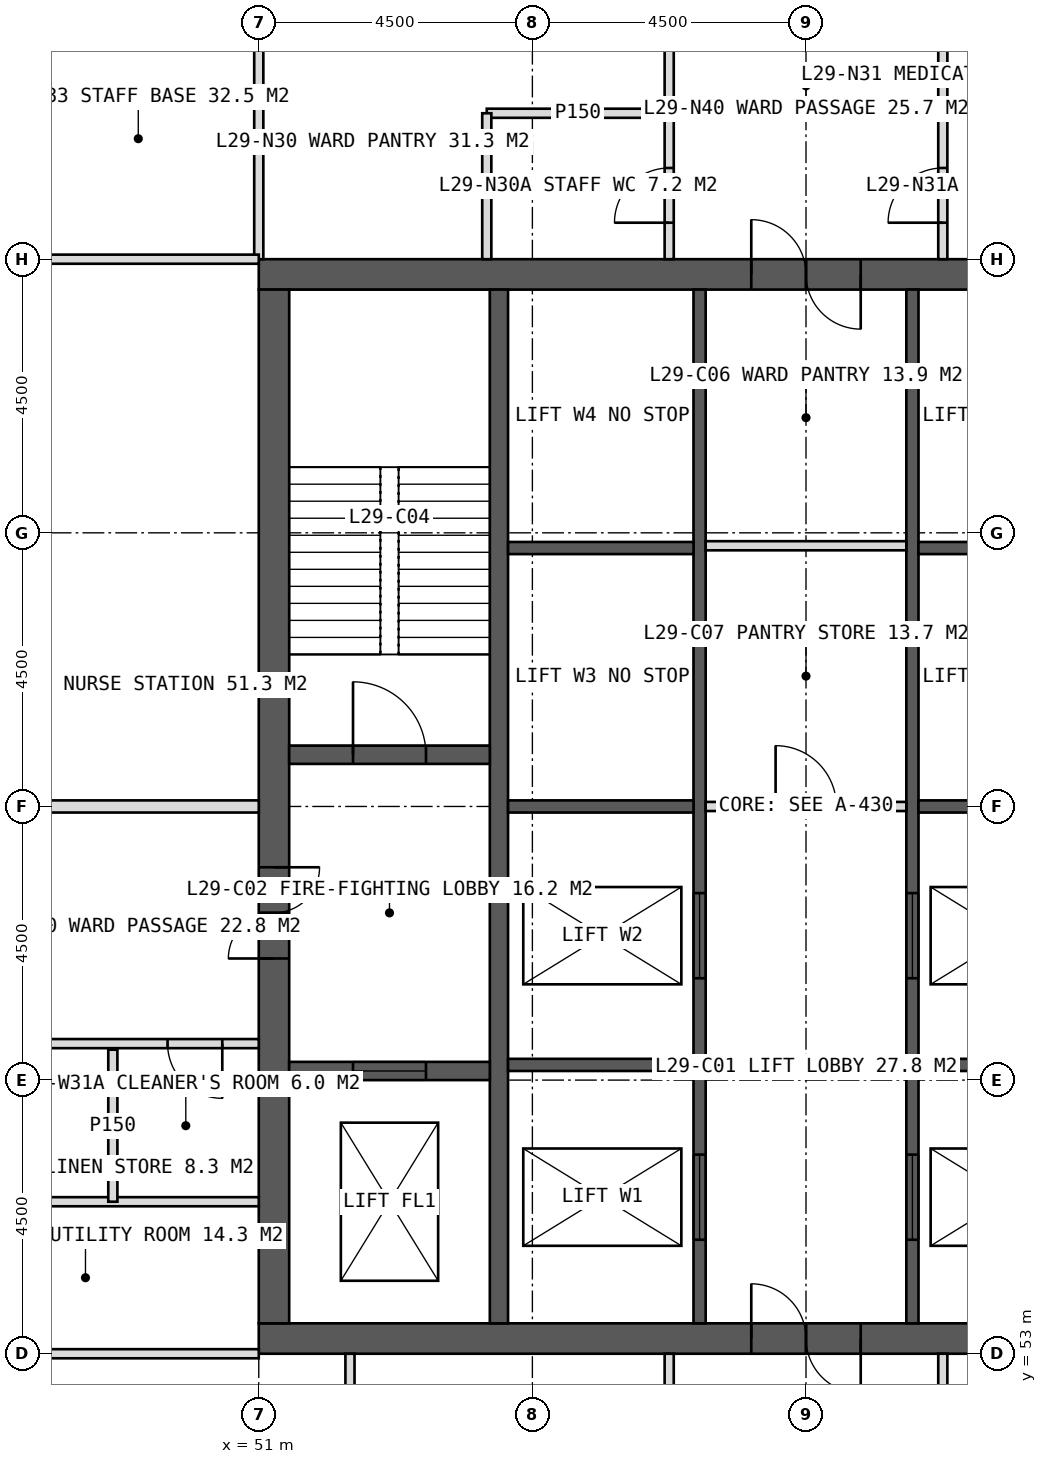
"""IFC4 building model, lengths in metres.
Left out: names, types, materials, properties, quantities, classifications, styles, units other than length and angle.
Written with IfcOpenShell. Run it as: python <this file> out.ifc"""

import sys

from ifc_helpers import new_model, si_unit, direction, frame, frame_2d, origin, place, context, subcontext, project, spatial, rectangle, extrude, element, fill, save


model = new_model("IFC4")
c1 = context("Model", 3, precision=1e-05, world=origin(), true_north=direction((0.0, 1.0)))
c2 = subcontext(c1, "Body", "Model", "MODEL_VIEW")
j1 = project(units=[si_unit("LENGTHUNIT", "METRE"), si_unit("PLANEANGLEUNIT", "RADIAN")], contexts=[c1])
p1 = place(None, origin())
s1 = spatial("IfcSite", under=j1, at=p1, CompositionType="ELEMENT")
p2 = place(p1, origin())
s2 = spatial("IfcBuilding", under=s1, at=p2, CompositionType="ELEMENT")
p3 = place(p2, frame((0.0, 0.0, 124.0)))
s3 = spatial("IfcBuildingStorey", under=s2, at=p3, CompositionType="ELEMENT", Elevation=124.0)
p4 = place(p3, frame((51.0, 70.75, 0.0), z_axis=(0.0, 0.0, 1.0), x_axis=(1.0, 0.0, 0.0)))
e1 = element("IfcWall", 1, at=p4, inside=s3, PredefinedType="SHEAR", context=c2, shape_type="SweptSolid", body=[
    extrude(rectangle(XDim=18.0, YDim=0.5, at=frame_2d((9.0, 0.0))), origin(), (0.0, 0.0, 1.0), 4.0),
])
p5 = place(p4, frame((8.1, 0.0, 0.0)))
e2 = element("IfcOpeningElement", 2, at=p5, cuts=e1, PredefinedType="OPENING", context=c2, shape_type="SweptSolid", body=[
    extrude(rectangle(XDim=1.8, YDim=2.2, at=frame_2d((0.9, 1.1))), frame((0.0, 0.26, 0.0), z_axis=(0.0, -1.0, 0.0), x_axis=(1.0, 0.0, 0.0)), (0.0, 0.0, 1.0), 0.52),
])
p6 = place(p3, frame((51.0, 53.25, 0.0), z_axis=(0.0, 0.0, 1.0), x_axis=(1.0, 0.0, 0.0)))
e3 = element("IfcWall", 3, at=p6, inside=s3, PredefinedType="SHEAR", context=c2, shape_type="SweptSolid", body=[
    extrude(rectangle(XDim=18.0, YDim=0.5, at=frame_2d((9.0, 0.0))), origin(), (0.0, 0.0, 1.0), 4.0),
])
p7 = place(p6, frame((8.1, 0.0, 0.0)))
e4 = element("IfcOpeningElement", 4, at=p7, cuts=e3, PredefinedType="OPENING", context=c2, shape_type="SweptSolid", body=[
    extrude(rectangle(XDim=1.8, YDim=2.2, at=frame_2d((0.9, 1.1))), frame((0.0, 0.26, 0.0), z_axis=(0.0, -1.0, 0.0), x_axis=(1.0, 0.0, 0.0)), (0.0, 0.0, 1.0), 0.52),
])
p8 = place(p3, frame((51.25, 53.5, 0.0), z_axis=(0.0, 0.0, 1.0), x_axis=(0.0, 1.0, 0.0)))
e5 = element("IfcWall", 5, at=p8, inside=s3, PredefinedType="SHEAR", context=c2, shape_type="SweptSolid", body=[
    extrude(rectangle(XDim=17.0, YDim=0.5, at=frame_2d((8.5, 0.0))), origin(), (0.0, 0.0, 1.0), 4.0),
])
p9 = place(p8, frame((6.0, 0.0, 0.0)))
e6 = element("IfcOpeningElement", 6, at=p9, cuts=e5, PredefinedType="OPENING", context=c2, shape_type="SweptSolid", body=[
    extrude(rectangle(XDim=1.5, YDim=2.2, at=frame_2d((0.75, 1.1))), frame((0.0, 0.26, 0.0), z_axis=(0.0, -1.0, 0.0), x_axis=(1.0, 0.0, 0.0)), (0.0, 0.0, 1.0), 0.52),
])
p10 = place(p3, frame((54.95, 53.5, 0.0), z_axis=(0.0, 0.0, 1.0), x_axis=(0.0, 1.0, 0.0)))
e7 = element("IfcWall", 7, at=p10, inside=s3, PredefinedType="SHEAR", context=c2, shape_type="SweptSolid", body=[
    extrude(rectangle(XDim=17.0, YDim=0.3, at=frame_2d((8.5, 0.0))), origin(), (0.0, 0.0, 1.0), 4.0),
])
p11 = place(p3, frame((58.25, 53.5, 0.0), z_axis=(0.0, 0.0, 1.0), x_axis=(0.0, 1.0, 0.0)))
e8 = element("IfcWall", 8, at=p11, inside=s3, PredefinedType="SHEAR", context=c2, shape_type="SweptSolid", body=[
    extrude(rectangle(XDim=17.0, YDim=0.2, at=frame_2d((8.5, 0.0))), origin(), (0.0, 0.0, 1.0), 4.0),
])
p12 = place(p11, frame((1.375, 0.0, 0.0)))
e9 = element("IfcOpeningElement", 9, at=p12, cuts=e8, PredefinedType="OPENING", context=c2, shape_type="SweptSolid", body=[
    extrude(rectangle(XDim=1.4, YDim=2.2, at=frame_2d((0.7, 1.1))), frame((0.0, 0.11, 0.0), z_axis=(0.0, -1.0, 0.0), x_axis=(1.0, 0.0, 0.0)), (0.0, 0.0, 1.0), 0.22),
])
p13 = place(p11, frame((5.675, 0.0, 0.0)))
e10 = element("IfcOpeningElement", 10, at=p13, cuts=e8, PredefinedType="OPENING", context=c2, shape_type="SweptSolid", body=[
    extrude(rectangle(XDim=1.4, YDim=2.2, at=frame_2d((0.7, 1.1))), frame((0.0, 0.11, 0.0), z_axis=(0.0, -1.0, 0.0), x_axis=(1.0, 0.0, 0.0)), (0.0, 0.0, 1.0), 0.22),
])
p14 = place(p3, frame((61.75, 53.5, 0.0), z_axis=(0.0, 0.0, 1.0), x_axis=(0.0, 1.0, 0.0)))
e11 = element("IfcWall", 11, at=p14, inside=s3, PredefinedType="SHEAR", context=c2, shape_type="SweptSolid", body=[
    extrude(rectangle(XDim=17.0, YDim=0.2, at=frame_2d((8.5, 0.0))), origin(), (0.0, 0.0, 1.0), 4.0),
])
p15 = place(p14, frame((1.375, 0.0, 0.0)))
e12 = element("IfcOpeningElement", 12, at=p15, cuts=e11, PredefinedType="OPENING", context=c2, shape_type="SweptSolid", body=[
    extrude(rectangle(XDim=1.4, YDim=2.2, at=frame_2d((0.7, 1.1))), frame((0.0, 0.11, 0.0), z_axis=(0.0, -1.0, 0.0), x_axis=(1.0, 0.0, 0.0)), (0.0, 0.0, 1.0), 0.22),
])
p16 = place(p14, frame((5.675, 0.0, 0.0)))
e13 = element("IfcOpeningElement", 13, at=p16, cuts=e11, PredefinedType="OPENING", context=c2, shape_type="SweptSolid", body=[
    extrude(rectangle(XDim=1.4, YDim=2.2, at=frame_2d((0.7, 1.1))), frame((0.0, 0.11, 0.0), z_axis=(0.0, -1.0, 0.0), x_axis=(1.0, 0.0, 0.0)), (0.0, 0.0, 1.0), 0.22),
])
for number, where, z_axis, x_axis in (
    (14, (55.1, 57.75, 0.0), (0.0, 0.0, 1.0), (1.0, 0.0, 0.0)),
    (15, (61.85, 57.75, 0.0), (0.0, 0.0, 1.0), (1.0, 0.0, 0.0)),
    (16, (55.1, 62.0, 0.0), (0.0, 0.0, 1.0), (1.0, 0.0, 0.0)),
    (17, (61.85, 62.0, 0.0), (0.0, 0.0, 1.0), (1.0, 0.0, 0.0)),
    (18, (55.1, 66.25, 0.0), (0.0, 0.0, 1.0), (1.0, 0.0, 0.0)),
    (19, (61.85, 66.25, 0.0), (0.0, 0.0, 1.0), (1.0, 0.0, 0.0)),
):
    element("IfcWall", number, at=place(p3, frame(where, z_axis=z_axis, x_axis=x_axis)), inside=s3, PredefinedType="SHEAR", context=c2, shape_type="SweptSolid", body=[
        extrude(rectangle(XDim=3.05, YDim=0.2, at=frame_2d((1.525, 0.0))), origin(), (0.0, 0.0, 1.0), 4.0),
    ])
p17 = place(p3, frame((51.5, 62.85, 0.0), z_axis=(0.0, 0.0, 1.0), x_axis=(1.0, 0.0, 0.0)))
e20 = element("IfcWall", 20, at=p17, inside=s3, PredefinedType="SHEAR", context=c2, shape_type="SweptSolid", body=[
    extrude(rectangle(XDim=3.3, YDim=0.3, at=frame_2d((1.65, 0.0))), origin(), (0.0, 0.0, 1.0), 4.0),
])
p18 = place(p17, frame((1.05, 0.0, 0.0)))
e21 = element("IfcOpeningElement", 21, at=p18, cuts=e20, PredefinedType="OPENING", context=c2, shape_type="SweptSolid", body=[
    extrude(rectangle(XDim=1.2, YDim=2.1, at=frame_2d((0.6, 1.05))), frame((0.0, 0.16, 0.0), z_axis=(0.0, -1.0, 0.0), x_axis=(1.0, 0.0, 0.0)), (0.0, 0.0, 1.0), 0.32),
])
p19 = place(p3, frame((51.5, 57.65, 0.0), z_axis=(0.0, 0.0, 1.0), x_axis=(1.0, 0.0, 0.0)))
e22 = element("IfcWall", 22, at=p19, inside=s3, PredefinedType="SHEAR", context=c2, shape_type="SweptSolid", body=[
    extrude(rectangle(XDim=3.3, YDim=0.3, at=frame_2d((1.65, 0.0))), origin(), (0.0, 0.0, 1.0), 4.0),
])
p20 = place(p19, frame((1.05, 0.0, 0.0)))
e23 = element("IfcOpeningElement", 23, at=p20, cuts=e22, PredefinedType="OPENING", context=c2, shape_type="SweptSolid", body=[
    extrude(rectangle(XDim=1.2, YDim=2.2, at=frame_2d((0.6, 1.1))), frame((0.0, 0.16, 0.0), z_axis=(0.0, -1.0, 0.0), x_axis=(1.0, 0.0, 0.0)), (0.0, 0.0, 1.0), 0.32),
])
p21 = place(p3, frame((51.0, 71.0, 0.0), z_axis=(0.0, 0.0, 1.0), x_axis=(0.0, 1.0, 0.0)))
e24 = element("IfcWall", 24, at=p21, inside=s3, PredefinedType="PARTITIONING", context=c2, shape_type="SweptSolid", body=[
    extrude(rectangle(XDim=5.7, YDim=0.15, at=frame_2d((2.85, 0.0))), origin(), (0.0, 0.0, 1.0), 3.75),
])
p22 = place(p3, frame((57.75, 71.0, 0.0), z_axis=(0.0, 0.0, 1.0), x_axis=(0.0, 1.0, 0.0)))
e25 = element("IfcWall", 25, at=p22, inside=s3, PredefinedType="PARTITIONING", context=c2, shape_type="SweptSolid", body=[
    extrude(rectangle(XDim=5.7, YDim=0.15, at=frame_2d((2.85, 0.0))), origin(), (0.0, 0.0, 1.0), 3.75),
])
p23 = place(p22, frame((0.6, 0.0, 0.0)))
e26 = element("IfcOpeningElement", 26, at=p23, cuts=e25, PredefinedType="OPENING", context=c2, shape_type="SweptSolid", body=[
    extrude(rectangle(XDim=0.9, YDim=2.1, at=frame_2d((0.45, 1.05))), frame((0.0, 0.085, 0.0), z_axis=(0.0, -1.0, 0.0), x_axis=(1.0, 0.0, 0.0)), (0.0, 0.0, 1.0), 0.17),
])
p24 = place(p3, frame((62.25, 71.0, 0.0), z_axis=(0.0, 0.0, 1.0), x_axis=(0.0, 1.0, 0.0)))
e27 = element("IfcWall", 27, at=p24, inside=s3, PredefinedType="PARTITIONING", context=c2, shape_type="SweptSolid", body=[
    extrude(rectangle(XDim=5.7, YDim=0.15, at=frame_2d((2.85, 0.0))), origin(), (0.0, 0.0, 1.0), 3.75),
])
p25 = place(p24, frame((0.6, 0.0, 0.0)))
e28 = element("IfcOpeningElement", 28, at=p25, cuts=e27, PredefinedType="OPENING", context=c2, shape_type="SweptSolid", body=[
    extrude(rectangle(XDim=0.9, YDim=2.1, at=frame_2d((0.45, 1.05))), frame((0.0, 0.085, 0.0), z_axis=(0.0, -1.0, 0.0), x_axis=(1.0, 0.0, 0.0)), (0.0, 0.0, 1.0), 0.17),
])
p26 = place(p3, frame((54.75, 73.4, 0.0), z_axis=(0.0, 0.0, 1.0), x_axis=(1.0, 0.0, 0.0)))
e29 = element("IfcWall", 29, at=p26, inside=s3, PredefinedType="PARTITIONING", context=c2, shape_type="SweptSolid", body=[
    extrude(rectangle(XDim=3.0, YDim=0.15, at=frame_2d((1.5, 0.0))), origin(), (0.0, 0.0, 1.0), 3.75),
])
p27 = place(p3, frame((54.75, 71.0, 0.0), z_axis=(0.0, 0.0, 1.0), x_axis=(0.0, 1.0, 0.0)))
e30 = element("IfcWall", 30, at=p27, inside=s3, PredefinedType="PARTITIONING", context=c2, shape_type="SweptSolid", body=[
    extrude(rectangle(XDim=2.4, YDim=0.15, at=frame_2d((1.2, 0.0))), origin(), (0.0, 0.0, 1.0), 3.75),
])
p28 = place(p3, frame((62.25, 73.4, 0.0), z_axis=(0.0, 0.0, 1.0), x_axis=(1.0, 0.0, 0.0)))
e31 = element("IfcWall", 31, at=p28, inside=s3, PredefinedType="PARTITIONING", context=c2, shape_type="SweptSolid", body=[
    extrude(rectangle(XDim=3.0, YDim=0.15, at=frame_2d((1.5, 0.0))), origin(), (0.0, 0.0, 1.0), 3.75),
])
p29 = place(p3, frame((51.0, 53.0, 0.0), z_axis=(0.0, 0.0, 1.0), x_axis=(-1.0, 0.0, 0.0)))
e32 = element("IfcWall", 32, at=p29, inside=s3, PredefinedType="PARTITIONING", context=c2, shape_type="SweptSolid", body=[
    extrude(rectangle(XDim=5.7, YDim=0.15, at=frame_2d((2.85, 0.0))), origin(), (0.0, 0.0, 1.0), 3.75),
])
p30 = place(p3, frame((51.0, 58.1, 0.0), z_axis=(0.0, 0.0, 1.0), x_axis=(-1.0, 0.0, 0.0)))
e33 = element("IfcWall", 33, at=p30, inside=s3, PredefinedType="PARTITIONING", context=c2, shape_type="SweptSolid", body=[
    extrude(rectangle(XDim=5.7, YDim=0.15, at=frame_2d((2.85, 0.0))), origin(), (0.0, 0.0, 1.0), 3.75),
])
p31 = place(p30, frame((0.6, 0.0, 0.0)))
e34 = element("IfcOpeningElement", 34, at=p31, cuts=e33, PredefinedType="OPENING", context=c2, shape_type="SweptSolid", body=[
    extrude(rectangle(XDim=0.9, YDim=2.1, at=frame_2d((0.45, 1.05))), frame((0.0, 0.085, 0.0), z_axis=(0.0, -1.0, 0.0), x_axis=(1.0, 0.0, 0.0)), (0.0, 0.0, 1.0), 0.17),
])
p32 = place(p3, frame((51.0, 62.0, 0.0), z_axis=(0.0, 0.0, 1.0), x_axis=(-1.0, 0.0, 0.0)))
e35 = element("IfcWall", 35, at=p32, inside=s3, PredefinedType="SOLIDWALL", context=c2, shape_type="SweptSolid", body=[
    extrude(rectangle(XDim=5.7, YDim=0.2, at=frame_2d((2.85, 0.0))), origin(), (0.0, 0.0, 1.0), 2.95),
])
for number, where, z_axis, x_axis in (
    (36, (51.0, 55.5, 0.0), (0.0, 0.0, 1.0), (-1.0, 0.0, 0.0)),
    (37, (51.0, 71.0, 0.0), (0.0, 0.0, 1.0), (-1.0, 0.0, 0.0)),
):
    element("IfcWall", number, at=place(p3, frame(where, z_axis=z_axis, x_axis=x_axis)), inside=s3, PredefinedType="PARTITIONING", context=c2, shape_type="SweptSolid", body=[
        extrude(rectangle(XDim=5.7, YDim=0.15, at=frame_2d((2.85, 0.0))), origin(), (0.0, 0.0, 1.0), 3.75),
    ])
p33 = place(p3, frame((48.6, 55.5, 0.0), z_axis=(0.0, 0.0, 1.0), x_axis=(0.0, 1.0, 0.0)))
e38 = element("IfcWall", 38, at=p33, inside=s3, PredefinedType="PARTITIONING", context=c2, shape_type="SweptSolid", body=[
    extrude(rectangle(XDim=2.5, YDim=0.15, at=frame_2d((1.25, 0.0))), origin(), (0.0, 0.0, 1.0), 3.75),
])
for number, where, z_axis, x_axis in (
    (39, (62.25, 53.0, 0.0), (0.0, 0.0, 1.0), (0.0, -1.0, 0.0)),
    (40, (57.75, 53.0, 0.0), (0.0, 0.0, 1.0), (0.0, -1.0, 0.0)),
    (41, (52.5, 53.0, 0.0), (0.0, 0.0, 1.0), (0.0, -1.0, 0.0)),
):
    element("IfcWall", number, at=place(p3, frame(where, z_axis=z_axis, x_axis=x_axis)), inside=s3, PredefinedType="PARTITIONING", context=c2, shape_type="SweptSolid", body=[
        extrude(rectangle(XDim=5.7, YDim=0.15, at=frame_2d((2.85, 0.0))), origin(), (0.0, 0.0, 1.0), 3.75),
    ])
p34 = place(p3, frame((58.35, 62.0, 0.0), z_axis=(0.0, 0.0, 1.0), x_axis=(1.0, 0.0, 0.0)))
e42 = element("IfcWall", 42, at=p34, inside=s3, PredefinedType="PARTITIONING", context=c2, shape_type="SweptSolid", body=[
    extrude(rectangle(XDim=3.3, YDim=0.15, at=frame_2d((1.65, 0.0))), origin(), (0.0, 0.0, 1.0), 3.75),
])
p35 = place(p34, frame((1.15, 0.0, 0.0)))
e43 = element("IfcOpeningElement", 43, at=p35, cuts=e42, PredefinedType="OPENING", context=c2, shape_type="SweptSolid", body=[
    extrude(rectangle(XDim=1.0, YDim=2.1, at=frame_2d((0.5, 1.05))), frame((0.0, 0.085, 0.0), z_axis=(0.0, -1.0, 0.0), x_axis=(1.0, 0.0, 0.0)), (0.0, 0.0, 1.0), 0.17),
])
p36 = place(p3, frame((58.35, 66.288, 0.0), z_axis=(0.0, 0.0, 1.0), x_axis=(1.0, 0.0, 0.0)))
e44 = element("IfcWall", 44, at=p36, inside=s3, PredefinedType="PARTITIONING", context=c2, shape_type="SweptSolid", body=[
    extrude(rectangle(XDim=3.3, YDim=0.15, at=frame_2d((1.65, 0.0))), origin(), (0.0, 0.0, 1.0), 3.75),
])
p37 = place(p23, origin())
e45 = element("IfcDoor", 45, at=p37, inside=s3, OperationType="SINGLE_SWING_LEFT", PredefinedType="DOOR", context=c2, shape_type="SweptSolid", body=[
    extrude(rectangle(XDim=0.9, YDim=2.1, at=frame_2d((0.45, 1.05))), frame((0.0, 0.025, 0.0), z_axis=(0.0, -1.0, 0.0), x_axis=(1.0, 0.0, 0.0)), (0.0, 0.0, 1.0), 0.05),
])
fill(e26, e45)
p38 = place(p25, origin())
e46 = element("IfcDoor", 46, at=p38, inside=s3, OperationType="SINGLE_SWING_LEFT", PredefinedType="DOOR", context=c2, shape_type="SweptSolid", body=[
    extrude(rectangle(XDim=0.9, YDim=2.1, at=frame_2d((0.45, 1.05))), frame((0.0, 0.025, 0.0), z_axis=(0.0, -1.0, 0.0), x_axis=(1.0, 0.0, 0.0)), (0.0, 0.0, 1.0), 0.05),
])
fill(e28, e46)
p39 = place(p31, origin())
e47 = element("IfcDoor", 47, at=p39, inside=s3, OperationType="SINGLE_SWING_LEFT", PredefinedType="DOOR", context=c2, shape_type="SweptSolid", body=[
    extrude(rectangle(XDim=0.9, YDim=2.1, at=frame_2d((0.45, 1.05))), frame((0.0, 0.025, 0.0), z_axis=(0.0, -1.0, 0.0), x_axis=(1.0, 0.0, 0.0)), (0.0, 0.0, 1.0), 0.05),
])
fill(e34, e47)
p40 = place(p7, origin())
e48 = element("IfcDoor", 48, at=p40, inside=s3, OperationType="DOUBLE_DOOR_SINGLE_SWING", PredefinedType="DOOR", context=c2, shape_type="SweptSolid", body=[
    extrude(rectangle(XDim=1.8, YDim=2.2, at=frame_2d((0.9, 1.1))), frame((0.0, 0.025, 0.0), z_axis=(0.0, -1.0, 0.0), x_axis=(1.0, 0.0, 0.0)), (0.0, 0.0, 1.0), 0.05),
])
fill(e4, e48)
p41 = place(p9, origin())
e49 = element("IfcDoor", 49, at=p41, inside=s3, OperationType="DOUBLE_DOOR_SINGLE_SWING", PredefinedType="DOOR", context=c2, shape_type="SweptSolid", body=[
    extrude(rectangle(XDim=1.5, YDim=2.2, at=frame_2d((0.75, 1.1))), frame((0.0, 0.025, 0.0), z_axis=(0.0, -1.0, 0.0), x_axis=(1.0, 0.0, 0.0)), (0.0, 0.0, 1.0), 0.05),
])
fill(e6, e49)
p42 = place(p18, origin())
e50 = element("IfcDoor", 50, at=p42, inside=s3, OperationType="SINGLE_SWING_LEFT", PredefinedType="DOOR", context=c2, shape_type="SweptSolid", body=[
    extrude(rectangle(XDim=1.2, YDim=2.1, at=frame_2d((0.6, 1.05))), frame((0.0, 0.025, 0.0), z_axis=(0.0, -1.0, 0.0), x_axis=(1.0, 0.0, 0.0)), (0.0, 0.0, 1.0), 0.05),
])
fill(e21, e50)
p43 = place(p20, origin())
e51 = element("IfcDoor", 51, at=p43, inside=s3, OperationType="SLIDING_TO_LEFT", PredefinedType="DOOR", context=c2, shape_type="SweptSolid", body=[
    extrude(rectangle(XDim=1.2, YDim=2.2, at=frame_2d((0.6, 1.1))), frame((0.0, 0.025, 0.0), z_axis=(0.0, -1.0, 0.0), x_axis=(1.0, 0.0, 0.0)), (0.0, 0.0, 1.0), 0.05),
])
fill(e23, e51)
p44 = place(p12, origin())
e52 = element("IfcDoor", 52, at=p44, inside=s3, OperationType="SLIDING_TO_LEFT", PredefinedType="DOOR", context=c2, shape_type="SweptSolid", body=[
    extrude(rectangle(XDim=1.4, YDim=2.2, at=frame_2d((0.7, 1.1))), frame((0.0, 0.025, 0.0), z_axis=(0.0, -1.0, 0.0), x_axis=(1.0, 0.0, 0.0)), (0.0, 0.0, 1.0), 0.05),
])
fill(e9, e52)
p45 = place(p15, origin())
e53 = element("IfcDoor", 53, at=p45, inside=s3, OperationType="SLIDING_TO_LEFT", PredefinedType="DOOR", context=c2, shape_type="SweptSolid", body=[
    extrude(rectangle(XDim=1.4, YDim=2.2, at=frame_2d((0.7, 1.1))), frame((0.0, 0.025, 0.0), z_axis=(0.0, -1.0, 0.0), x_axis=(1.0, 0.0, 0.0)), (0.0, 0.0, 1.0), 0.05),
])
fill(e12, e53)
p46 = place(p13, origin())
e54 = element("IfcDoor", 54, at=p46, inside=s3, OperationType="SLIDING_TO_LEFT", PredefinedType="DOOR", context=c2, shape_type="SweptSolid", body=[
    extrude(rectangle(XDim=1.4, YDim=2.2, at=frame_2d((0.7, 1.1))), frame((0.0, 0.025, 0.0), z_axis=(0.0, -1.0, 0.0), x_axis=(1.0, 0.0, 0.0)), (0.0, 0.0, 1.0), 0.05),
])
fill(e10, e54)
p47 = place(p16, origin())
e55 = element("IfcDoor", 55, at=p47, inside=s3, OperationType="SLIDING_TO_LEFT", PredefinedType="DOOR", context=c2, shape_type="SweptSolid", body=[
    extrude(rectangle(XDim=1.4, YDim=2.2, at=frame_2d((0.7, 1.1))), frame((0.0, 0.025, 0.0), z_axis=(0.0, -1.0, 0.0), x_axis=(1.0, 0.0, 0.0)), (0.0, 0.0, 1.0), 0.05),
])
fill(e13, e55)
p48 = place(p35, origin())
e56 = element("IfcDoor", 56, at=p48, inside=s3, OperationType="SINGLE_SWING_LEFT", PredefinedType="DOOR", context=c2, shape_type="SweptSolid", body=[
    extrude(rectangle(XDim=1.0, YDim=2.1, at=frame_2d((0.5, 1.05))), frame((0.0, 0.025, 0.0), z_axis=(0.0, -1.0, 0.0), x_axis=(1.0, 0.0, 0.0)), (0.0, 0.0, 1.0), 0.05),
])
fill(e43, e56)
p49 = place(p5, origin())
e57 = element("IfcDoor", 57, at=p49, inside=s3, OperationType="DOUBLE_DOOR_SINGLE_SWING", PredefinedType="DOOR", context=c2, shape_type="SweptSolid", body=[
    extrude(rectangle(XDim=1.8, YDim=2.2, at=frame_2d((0.9, 1.1))), frame((0.0, 0.025, 0.0), z_axis=(0.0, -1.0, 0.0), x_axis=(1.0, 0.0, 0.0)), (0.0, 0.0, 1.0), 0.05),
])
fill(e2, e57)
save(model, sys.argv[1])
